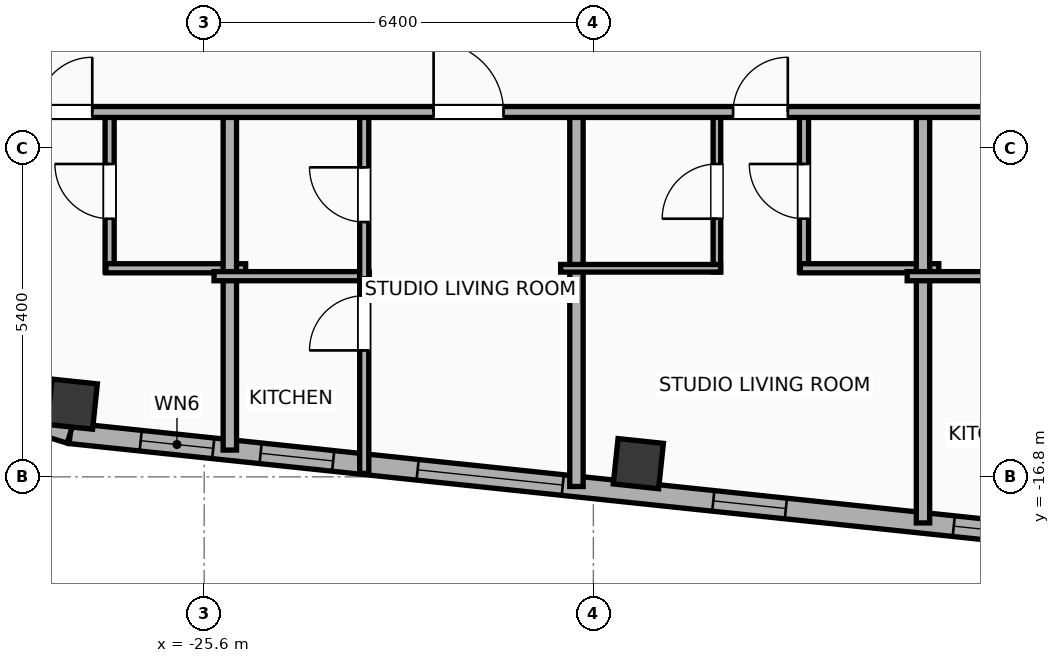
"""IFC4 building model, lengths in metres.
Left out: names, types, materials, properties, quantities, classifications, styles, units other than length and angle.
Written with IfcOpenShell. Run it as: python <this file> out.ifc"""

import sys

from ifc_helpers import new_model, si_unit, direction, frame, frame_2d, origin, origin_2d, place, context, subcontext, project, spatial, rectangle, hollow_rectangle, extrude, element, fill, save


model = new_model("IFC4")
c1 = context("Model", 3, precision=1e-05, world=origin(), true_north=direction((0.0, 1.0)))
c2 = subcontext(c1, "Body", "Model", "MODEL_VIEW")
j1 = project(units=[si_unit("LENGTHUNIT", "METRE"), si_unit("PLANEANGLEUNIT", "RADIAN")], contexts=[c1])
p1 = place(None, origin())
s1 = spatial("IfcSite", under=j1, at=p1, CompositionType="ELEMENT")
p2 = place(p1, origin())
s2 = spatial("IfcBuilding", under=s1, at=p2, CompositionType="ELEMENT")
p3 = place(p2, frame((0.0, 0.0, 279.5)))
s3 = spatial("IfcBuildingStorey", under=s2, at=p3, CompositionType="ELEMENT", Elevation=279.5)
for number, where, z_axis, x_axis in (
    (1, (-27.769, -15.604, 0.0), (0.0, 0.0, 1.0), (0.995, -0.105, 0.0)),
    (2, (-18.46, -16.583, 0.0), (0.0, 0.0, 1.0), (0.995, -0.105, 0.0)),
):
    element("IfcColumn", number, at=place(p3, frame(where, z_axis=z_axis, x_axis=x_axis)), inside=s3, PredefinedType="COLUMN", context=c2, shape_type="SweptSolid", body=[
        extrude(hollow_rectangle(XDim=0.75, YDim=0.75, WallThickness=0.025, at=origin_2d()), origin(), (0.0, 0.0, 1.0), 3.9),
    ])
p4 = place(p3, frame((18.708, -20.972, 0.0), z_axis=(0.0, 0.0, 1.0), x_axis=(-0.994521888554, 0.104528528102, 0.0)))
e3 = element("IfcWall", 3, at=p4, inside=s3, PredefinedType="ELEMENTEDWALL", context=c2, shape_type="SweptSolid", body=[
    extrude(rectangle(XDim=46.766, YDim=0.34, at=frame_2d((23.383, 0.0))), origin(), (0.0, 0.0, 1.0), 3.65),
])
p5 = place(p4, frame((23.833, 0.0, 0.75)))
e4 = element("IfcOpeningElement", 4, at=p5, cuts=e3, PredefinedType="OPENING", context=c2, shape_type="SweptSolid", body=[
    extrude(rectangle(XDim=2.4, YDim=2.1, at=frame_2d((1.2, 1.05))), frame((0.0, 0.18, 0.0), z_axis=(0.0, -1.0, 0.0), x_axis=(1.0, 0.0, 0.0)), (0.0, 0.0, 1.0), 0.36),
])
p6 = place(p4, frame((38.622, 0.0, 0.75)))
e5 = element("IfcOpeningElement", 5, at=p6, cuts=e3, PredefinedType="OPENING", context=c2, shape_type="SweptSolid", body=[
    extrude(rectangle(XDim=2.4, YDim=2.1, at=frame_2d((1.2, 1.05))), frame((0.0, 0.18, 0.0), z_axis=(0.0, -1.0, 0.0), x_axis=(1.0, 0.0, 0.0)), (0.0, 0.0, 1.0), 0.36),
])
p7 = place(p4, frame((44.402, 0.0, 0.75)))
e6 = element("IfcOpeningElement", 6, at=p7, cuts=e3, PredefinedType="OPENING", context=c2, shape_type="SweptSolid", body=[
    extrude(rectangle(XDim=1.2, YDim=2.05, at=frame_2d((0.6, 1.025))), frame((0.0, 0.18, 0.0), z_axis=(0.0, -1.0, 0.0), x_axis=(1.0, 0.0, 0.0)), (0.0, 0.0, 1.0), 0.36),
])
p8 = place(p4, frame((42.419, 0.0, 0.75)))
e7 = element("IfcOpeningElement", 7, at=p8, cuts=e3, PredefinedType="OPENING", context=c2, shape_type="SweptSolid", body=[
    extrude(rectangle(XDim=1.2, YDim=2.05, at=frame_2d((0.6, 1.025))), frame((0.0, 0.18, 0.0), z_axis=(0.0, -1.0, 0.0), x_axis=(1.0, 0.0, 0.0)), (0.0, 0.0, 1.0), 0.36),
])
p9 = place(p4, frame((34.933, 0.0, 0.75)))
e8 = element("IfcOpeningElement", 8, at=p9, cuts=e3, PredefinedType="OPENING", context=c2, shape_type="SweptSolid", body=[
    extrude(rectangle(XDim=1.2, YDim=2.05, at=frame_2d((0.6, 1.025))), frame((0.0, 0.18, 0.0), z_axis=(0.0, -1.0, 0.0), x_axis=(1.0, 0.0, 0.0)), (0.0, 0.0, 1.0), 0.36),
])
p10 = place(p4, frame((28.692, 0.0, 0.75)))
e9 = element("IfcOpeningElement", 9, at=p10, cuts=e3, PredefinedType="OPENING", context=c2, shape_type="SweptSolid", body=[
    extrude(rectangle(XDim=1.2, YDim=2.05, at=frame_2d((0.6, 1.025))), frame((0.0, 0.18, 0.0), z_axis=(0.0, -1.0, 0.0), x_axis=(1.0, 0.0, 0.0)), (0.0, 0.0, 1.0), 0.36),
])
p11 = place(p4, frame((30.957, 0.0, 0.75)))
e10 = element("IfcOpeningElement", 10, at=p11, cuts=e3, PredefinedType="OPENING", context=c2, shape_type="SweptSolid", body=[
    extrude(rectangle(XDim=1.2, YDim=2.05, at=frame_2d((0.6, 1.025))), frame((0.0, 0.18, 0.0), z_axis=(0.0, -1.0, 0.0), x_axis=(1.0, 0.0, 0.0)), (0.0, 0.0, 1.0), 0.36),
])
p12 = place(p4, frame((7.51, 0.0, 0.75)))
e11 = element("IfcOpeningElement", 11, at=p12, cuts=e3, PredefinedType="OPENING", context=c2, shape_type="SweptSolid", body=[
    extrude(rectangle(XDim=1.2, YDim=2.05, at=frame_2d((0.6, 1.025))), frame((0.0, 0.18, 0.0), z_axis=(0.0, -1.0, 0.0), x_axis=(1.0, 0.0, 0.0)), (0.0, 0.0, 1.0), 0.36),
])
p13 = place(p4, frame((4.177, 0.0, 0.75)))
e12 = element("IfcOpeningElement", 12, at=p13, cuts=e3, PredefinedType="OPENING", context=c2, shape_type="SweptSolid", body=[
    extrude(rectangle(XDim=1.2, YDim=2.05, at=frame_2d((0.6, 1.025))), frame((0.0, 0.18, 0.0), z_axis=(0.0, -1.0, 0.0), x_axis=(1.0, 0.0, 0.0)), (0.0, 0.0, 1.0), 0.36),
])
p14 = place(p4, frame((1.378, 0.0, 0.75)))
e13 = element("IfcOpeningElement", 13, at=p14, cuts=e3, PredefinedType="OPENING", context=c2, shape_type="SweptSolid", body=[
    extrude(rectangle(XDim=1.2, YDim=2.05, at=frame_2d((0.6, 1.025))), frame((0.0, 0.18, 0.0), z_axis=(0.0, -1.0, 0.0), x_axis=(1.0, 0.0, 0.0)), (0.0, 0.0, 1.0), 0.36),
])
p15 = place(p4, frame((20.254, 0.0, 0.75)))
e14 = element("IfcOpeningElement", 14, at=p15, cuts=e3, PredefinedType="OPENING", context=c2, shape_type="SweptSolid", body=[
    extrude(rectangle(XDim=1.2, YDim=2.05, at=frame_2d((0.6, 1.025))), frame((0.0, 0.18, 0.0), z_axis=(0.0, -1.0, 0.0), x_axis=(1.0, 0.0, 0.0)), (0.0, 0.0, 1.0), 0.36),
])
p16 = place(p4, frame((16.172, 0.0, 0.75)))
e15 = element("IfcOpeningElement", 15, at=p16, cuts=e3, PredefinedType="OPENING", context=c2, shape_type="SweptSolid", body=[
    extrude(rectangle(XDim=1.2, YDim=2.05, at=frame_2d((0.6, 1.025))), frame((0.0, 0.18, 0.0), z_axis=(0.0, -1.0, 0.0), x_axis=(1.0, 0.0, 0.0)), (0.0, 0.0, 1.0), 0.36),
])
p17 = place(p4, frame((12.11, 0.0, 0.75)))
e16 = element("IfcOpeningElement", 16, at=p17, cuts=e3, PredefinedType="OPENING", context=c2, shape_type="SweptSolid", body=[
    extrude(rectangle(XDim=1.2, YDim=2.05, at=frame_2d((0.6, 1.025))), frame((0.0, 0.18, 0.0), z_axis=(0.0, -1.0, 0.0), x_axis=(1.0, 0.0, 0.0)), (0.0, 0.0, 1.0), 0.36),
])
p18 = place(p3, frame((-27.802, -16.084, 0.0), z_axis=(0.0, 0.0, 1.0), x_axis=(-0.955007802701, 0.296580674994, 0.0)))
e17 = element("IfcWall", 17, at=p18, inside=s3, PredefinedType="ELEMENTEDWALL", context=c2, shape_type="SweptSolid", body=[
    extrude(rectangle(XDim=1.354, YDim=0.34, at=frame_2d((0.677, 0.0))), origin(), (0.0, 0.0, 1.0), 3.65),
])
p19 = place(p3, frame((-30.87, -12.296, 0.0), z_axis=(0.0, 0.0, 1.0), x_axis=(0.104533282919, 0.994521388791, 0.0)))
e18 = element("IfcWall", 18, at=p19, inside=s3, PredefinedType="ELEMENTEDWALL", context=c2, shape_type="SweptSolid", body=[
    extrude(rectangle(XDim=30.366, YDim=0.34, at=frame_2d((15.183, 0.0))), origin(), (0.0, 0.0, 1.0), 3.65),
])
p20 = place(p19, frame((5.842, 0.0, 0.75)))
e19 = element("IfcOpeningElement", 19, at=p20, cuts=e18, PredefinedType="OPENING", context=c2, shape_type="SweptSolid", body=[
    extrude(rectangle(XDim=1.8, YDim=2.1, at=frame_2d((0.9, 1.05))), frame((0.0, 0.18, 0.0), z_axis=(0.0, -1.0, 0.0), x_axis=(1.0, 0.0, 0.0)), (0.0, 0.0, 1.0), 0.36),
])
p21 = place(p19, frame((23.525, 0.0, 0.75)))
e20 = element("IfcOpeningElement", 20, at=p21, cuts=e18, PredefinedType="OPENING", context=c2, shape_type="SweptSolid", body=[
    extrude(rectangle(XDim=1.8, YDim=2.1, at=frame_2d((0.9, 1.05))), frame((0.0, 0.18, 0.0), z_axis=(0.0, -1.0, 0.0), x_axis=(1.0, 0.0, 0.0)), (0.0, 0.0, 1.0), 0.36),
])
p22 = place(p19, frame((27.368, 0.0, 0.75)))
e21 = element("IfcOpeningElement", 21, at=p22, cuts=e18, PredefinedType="OPENING", context=c2, shape_type="SweptSolid", body=[
    extrude(rectangle(XDim=1.2, YDim=2.05, at=frame_2d((0.6, 1.025))), frame((0.0, 0.18, 0.0), z_axis=(0.0, -1.0, 0.0), x_axis=(1.0, 0.0, 0.0)), (0.0, 0.0, 1.0), 0.36),
])
p23 = place(p19, frame((16.487, 0.0, 0.75)))
e22 = element("IfcOpeningElement", 22, at=p23, cuts=e18, PredefinedType="OPENING", context=c2, shape_type="SweptSolid", body=[
    extrude(rectangle(XDim=1.2, YDim=2.05, at=frame_2d((0.6, 1.025))), frame((0.0, 0.18, 0.0), z_axis=(0.0, -1.0, 0.0), x_axis=(1.0, 0.0, 0.0)), (0.0, 0.0, 1.0), 0.36),
])
p24 = place(p3, frame((-27.155, -13.43, 0.0), z_axis=(0.0, 0.0, 1.0), x_axis=(0.0, 1.0, 0.0)))
e23 = element("IfcWall", 23, at=p24, inside=s3, PredefinedType="PLUMBINGWALL", context=c2, shape_type="SweptSolid", body=[
    extrude(rectangle(XDim=2.65, YDim=0.15, at=frame_2d((1.325, 0.0))), origin(), (0.0, 0.0, 1.0), 3.65),
])
p25 = place(p24, frame((0.875, 0.0, 0.0)))
e24 = element("IfcOpeningElement", 24, at=p25, cuts=e23, PredefinedType="OPENING", context=c2, shape_type="SweptSolid", body=[
    extrude(rectangle(XDim=0.9, YDim=2.05, at=frame_2d((0.45, 1.025))), frame((0.0, 0.085, 0.0), z_axis=(0.0, -1.0, 0.0), x_axis=(1.0, 0.0, 0.0)), (0.0, 0.0, 1.0), 0.17),
])
p26 = place(p3, frame((-27.215, -13.37, 0.0), z_axis=(0.0, 0.0, 1.0), x_axis=(1.0, 0.0, 0.0)))
e25 = element("IfcWall", 25, at=p26, inside=s3, PredefinedType="PLUMBINGWALL", context=c2, shape_type="SweptSolid", body=[
    extrude(rectangle(XDim=2.297, YDim=0.15, at=frame_2d((1.148, 0.0))), origin(), (0.0, 0.0, 1.0), 3.65),
])
p27 = place(p3, frame((-25.178, -16.36, 0.0), z_axis=(0.0, 0.0, 1.0), x_axis=(0.0, 1.0, 0.0)))
e26 = element("IfcWall", 26, at=p27, inside=s3, PredefinedType="PARTITIONING", context=c2, shape_type="SweptSolid", body=[
    extrude(rectangle(XDim=5.64, YDim=0.22, at=frame_2d((2.82, 0.0))), origin(), (0.0, 0.0, 1.0), 3.65),
])
p28 = place(p3, frame((-25.438, -13.5, 0.0), z_axis=(0.0, 0.0, 1.0), x_axis=(1.0, 0.0, 0.0)))
e27 = element("IfcWall", 27, at=p28, inside=s3, PredefinedType="PLUMBINGWALL", context=c2, shape_type="SweptSolid", body=[
    extrude(rectangle(XDim=2.55, YDim=0.15, at=frame_2d((1.275, 0.0))), origin(), (0.0, 0.0, 1.0), 3.65),
])
p29 = place(p3, frame((-22.968, -16.743, 0.0), z_axis=(0.0, 0.0, 1.0), x_axis=(0.0, 1.0, 0.0)))
e28 = element("IfcWall", 28, at=p29, inside=s3, PredefinedType="PLUMBINGWALL", context=c2, shape_type="SweptSolid", body=[
    extrude(rectangle(XDim=3.283, YDim=0.15, at=frame_2d((1.641, 0.0))), origin(), (0.0, 0.0, 1.0), 3.65),
])
p30 = place(p29, frame((2.022, 0.0, 0.0)))
e29 = element("IfcOpeningElement", 29, at=p30, cuts=e28, PredefinedType="OPENING", context=c2, shape_type="SweptSolid", body=[
    extrude(rectangle(XDim=0.9, YDim=2.05, at=frame_2d((0.45, 1.025))), frame((0.0, 0.085, 0.0), z_axis=(0.0, -1.0, 0.0), x_axis=(1.0, 0.0, 0.0)), (0.0, 0.0, 1.0), 0.17),
])
p31 = place(p3, frame((-22.968, -13.54, 0.0), z_axis=(0.0, 0.0, 1.0), x_axis=(0.0, 1.0, 0.0)))
e30 = element("IfcWall", 30, at=p31, inside=s3, PredefinedType="PLUMBINGWALL", context=c2, shape_type="SweptSolid", body=[
    extrude(rectangle(XDim=2.76, YDim=0.15, at=frame_2d((1.38, 0.0))), origin(), (0.0, 0.0, 1.0), 3.65),
])
p32 = place(p31, frame((0.93, 0.0, 0.0)))
e31 = element("IfcOpeningElement", 31, at=p32, cuts=e30, PredefinedType="OPENING", context=c2, shape_type="SweptSolid", body=[
    extrude(rectangle(XDim=0.9, YDim=2.05, at=frame_2d((0.45, 1.025))), frame((0.0, 0.085, 0.0), z_axis=(0.0, -1.0, 0.0), x_axis=(1.0, 0.0, 0.0)), (0.0, 0.0, 1.0), 0.17),
])
p33 = place(p3, frame((-19.478, -16.959, 0.0), z_axis=(0.0, 0.0, 1.0), x_axis=(0.0, 1.0, 0.0)))
e32 = element("IfcWall", 32, at=p33, inside=s3, PredefinedType="PARTITIONING", context=c2, shape_type="SweptSolid", body=[
    extrude(rectangle(XDim=6.239, YDim=0.22, at=frame_2d((3.119, 0.0))), origin(), (0.0, 0.0, 1.0), 3.65),
])
p34 = place(p3, frame((-17.168, -13.43, 0.0), z_axis=(0.0, 0.0, 1.0), x_axis=(0.0, 1.0, 0.0)))
e33 = element("IfcWall", 33, at=p34, inside=s3, PredefinedType="PARTITIONING", context=c2, shape_type="SweptSolid", body=[
    extrude(rectangle(XDim=2.65, YDim=0.125, at=frame_2d((1.325, 0.0))), origin(), (0.0, 0.0, 1.0), 3.65),
])
p35 = place(p34, frame((0.875, 0.0, 0.0)))
e34 = element("IfcOpeningElement", 34, at=p35, cuts=e33, PredefinedType="OPENING", context=c2, shape_type="SweptSolid", body=[
    extrude(rectangle(XDim=0.9, YDim=2.05, at=frame_2d((0.45, 1.025))), frame((0.0, 0.073, 0.0), z_axis=(0.0, -1.0, 0.0), x_axis=(1.0, 0.0, 0.0)), (0.0, 0.0, 1.0), 0.145),
])
p36 = place(p3, frame((-15.736, -13.43, 0.0), z_axis=(0.0, 0.0, 1.0), x_axis=(0.0, 1.0, 0.0)))
e35 = element("IfcWall", 35, at=p36, inside=s3, PredefinedType="PLUMBINGWALL", context=c2, shape_type="SweptSolid", body=[
    extrude(rectangle(XDim=2.65, YDim=0.15, at=frame_2d((1.325, 0.0))), origin(), (0.0, 0.0, 1.0), 3.65),
])
p37 = place(p36, frame((0.875, 0.0, 0.0)))
e36 = element("IfcOpeningElement", 36, at=p37, cuts=e35, PredefinedType="OPENING", context=c2, shape_type="SweptSolid", body=[
    extrude(rectangle(XDim=0.9, YDim=2.05, at=frame_2d((0.45, 1.025))), frame((0.0, 0.085, 0.0), z_axis=(0.0, -1.0, 0.0), x_axis=(1.0, 0.0, 0.0)), (0.0, 0.0, 1.0), 0.17),
])
p38 = place(p3, frame((-19.738, -13.37, 0.0), z_axis=(0.0, 0.0, 1.0), x_axis=(1.0, 0.0, 0.0)))
e37 = element("IfcWall", 37, at=p38, inside=s3, PredefinedType="PARTITIONING", context=c2, shape_type="SweptSolid", body=[
    extrude(rectangle(XDim=2.63, YDim=0.125, at=frame_2d((1.315, 0.0))), origin(), (0.0, 0.0, 1.0), 3.65),
])
p39 = place(p3, frame((-15.796, -13.37, 0.0), z_axis=(0.0, 0.0, 1.0), x_axis=(1.0, 0.0, 0.0)))
e38 = element("IfcWall", 38, at=p39, inside=s3, PredefinedType="PLUMBINGWALL", context=c2, shape_type="SweptSolid", body=[
    extrude(rectangle(XDim=2.277, YDim=0.15, at=frame_2d((1.138, 0.0))), origin(), (0.0, 0.0, 1.0), 3.65),
])
p40 = place(p3, frame((-13.779, -17.558, 0.0), z_axis=(0.0, 0.0, 1.0), x_axis=(0.0, 1.0, 0.0)))
e39 = element("IfcWall", 39, at=p40, inside=s3, PredefinedType="PARTITIONING", context=c2, shape_type="SweptSolid", body=[
    extrude(rectangle(XDim=6.838, YDim=0.22, at=frame_2d((3.419, 0.0))), origin(), (0.0, 0.0, 1.0), 3.65),
])
p41 = place(p3, frame((-14.039, -13.5, 0.0), z_axis=(0.0, 0.0, 1.0), x_axis=(1.0, 0.0, 0.0)))
e40 = element("IfcWall", 40, at=p41, inside=s3, PredefinedType="PLUMBINGWALL", context=c2, shape_type="SweptSolid", body=[
    extrude(rectangle(XDim=2.55, YDim=0.15, at=frame_2d((1.275, 0.0))), origin(), (0.0, 0.0, 1.0), 3.65),
])
p42 = place(p3, frame((-30.713, -10.8, 0.0), z_axis=(0.0, 0.0, 1.0), x_axis=(1.0, 0.0, 0.0)))
e41 = element("IfcWall", 41, at=p42, inside=s3, PredefinedType="PARTITIONING", context=c2, shape_type="SweptSolid", body=[
    extrude(rectangle(XDim=22.633, YDim=0.18, at=frame_2d((11.316, 0.0))), origin(), (0.0, 0.0, 1.0), 3.65),
])
p43 = place(p42, frame((2.372, 0.0, 0.0)))
e42 = element("IfcOpeningElement", 42, at=p43, cuts=e41, PredefinedType="OPENING", context=c2, shape_type="SweptSolid", body=[
    extrude(rectangle(XDim=0.9, YDim=2.05, at=frame_2d((0.45, 1.025))), frame((0.0, 0.1, 0.0), z_axis=(0.0, -1.0, 0.0), x_axis=(1.0, 0.0, 0.0)), (0.0, 0.0, 1.0), 0.2),
])
p44 = place(p42, frame((8.885, 0.0, 0.0)))
e43 = element("IfcOpeningElement", 43, at=p44, cuts=e41, PredefinedType="OPENING", context=c2, shape_type="SweptSolid", body=[
    extrude(rectangle(XDim=1.15, YDim=2.05, at=frame_2d((0.575, 1.025))), frame((0.0, 0.1, 0.0), z_axis=(0.0, -1.0, 0.0), x_axis=(1.0, 0.0, 0.0)), (0.0, 0.0, 1.0), 0.2),
])
p45 = place(p42, frame((13.811, 0.0, 0.0)))
e44 = element("IfcOpeningElement", 44, at=p45, cuts=e41, PredefinedType="OPENING", context=c2, shape_type="SweptSolid", body=[
    extrude(rectangle(XDim=0.9, YDim=2.05, at=frame_2d((0.45, 1.025))), frame((0.0, 0.1, 0.0), z_axis=(0.0, -1.0, 0.0), x_axis=(1.0, 0.0, 0.0)), (0.0, 0.0, 1.0), 0.2),
])
p46 = place(p42, frame((20.283, 0.0, 0.0)))
e45 = element("IfcOpeningElement", 45, at=p46, cuts=e41, PredefinedType="OPENING", context=c2, shape_type="SweptSolid", body=[
    extrude(rectangle(XDim=1.15, YDim=2.05, at=frame_2d((0.575, 1.025))), frame((0.0, 0.1, 0.0), z_axis=(0.0, -1.0, 0.0), x_axis=(1.0, 0.0, 0.0)), (0.0, 0.0, 1.0), 0.2),
])
p47 = place(p6, origin())
e46 = element("IfcWindow", 46, at=p47, inside=s3, PartitioningType="SINGLE_PANEL", PredefinedType="WINDOW", context=c2, shape_type="SweptSolid", body=[
    extrude(rectangle(XDim=2.4, YDim=2.1, at=frame_2d((1.2, 1.05))), frame((0.0, 0.03, 0.0), z_axis=(0.0, -1.0, 0.0), x_axis=(1.0, 0.0, 0.0)), (0.0, 0.0, 1.0), 0.06),
])
fill(e5, e46)
p48 = place(p7, origin())
e47 = element("IfcWindow", 47, at=p48, inside=s3, PartitioningType="SINGLE_PANEL", PredefinedType="WINDOW", context=c2, shape_type="SweptSolid", body=[
    extrude(rectangle(XDim=1.2, YDim=2.05, at=frame_2d((0.6, 1.025))), frame((0.0, 0.03, 0.0), z_axis=(0.0, -1.0, 0.0), x_axis=(1.0, 0.0, 0.0)), (0.0, 0.0, 1.0), 0.06),
])
fill(e6, e47)
p49 = place(p8, origin())
e48 = element("IfcWindow", 48, at=p49, inside=s3, PartitioningType="SINGLE_PANEL", PredefinedType="WINDOW", context=c2, shape_type="SweptSolid", body=[
    extrude(rectangle(XDim=1.2, YDim=2.05, at=frame_2d((0.6, 1.025))), frame((0.0, 0.03, 0.0), z_axis=(0.0, -1.0, 0.0), x_axis=(1.0, 0.0, 0.0)), (0.0, 0.0, 1.0), 0.06),
])
fill(e7, e48)
p50 = place(p9, origin())
e49 = element("IfcWindow", 49, at=p50, inside=s3, PartitioningType="SINGLE_PANEL", PredefinedType="WINDOW", context=c2, shape_type="SweptSolid", body=[
    extrude(rectangle(XDim=1.2, YDim=2.05, at=frame_2d((0.6, 1.025))), frame((0.0, 0.03, 0.0), z_axis=(0.0, -1.0, 0.0), x_axis=(1.0, 0.0, 0.0)), (0.0, 0.0, 1.0), 0.06),
])
fill(e8, e49)
p51 = place(p11, origin())
e50 = element("IfcWindow", 50, at=p51, inside=s3, PartitioningType="SINGLE_PANEL", PredefinedType="WINDOW", context=c2, shape_type="SweptSolid", body=[
    extrude(rectangle(XDim=1.2, YDim=2.05, at=frame_2d((0.6, 1.025))), frame((0.0, 0.03, 0.0), z_axis=(0.0, -1.0, 0.0), x_axis=(1.0, 0.0, 0.0)), (0.0, 0.0, 1.0), 0.06),
])
fill(e10, e50)
p52 = place(p25, origin())
e51 = element("IfcDoor", 51, at=p52, inside=s3, OperationType="SINGLE_SWING_RIGHT", PredefinedType="DOOR", context=c2, shape_type="SweptSolid", body=[
    extrude(rectangle(XDim=0.9, YDim=2.05, at=frame_2d((0.45, 1.025))), frame((0.0, 0.025, 0.0), z_axis=(0.0, -1.0, 0.0), x_axis=(1.0, 0.0, 0.0)), (0.0, 0.0, 1.0), 0.05),
])
fill(e24, e51)
p53 = place(p30, origin())
e52 = element("IfcDoor", 52, at=p53, inside=s3, OperationType="SINGLE_SWING_LEFT", PredefinedType="DOOR", context=c2, shape_type="SweptSolid", body=[
    extrude(rectangle(XDim=0.9, YDim=2.05, at=frame_2d((0.45, 1.025))), frame((0.0, 0.025, 0.0), z_axis=(0.0, -1.0, 0.0), x_axis=(1.0, 0.0, 0.0)), (0.0, 0.0, 1.0), 0.05),
])
fill(e29, e52)
p54 = place(p32, origin())
e53 = element("IfcDoor", 53, at=p54, inside=s3, OperationType="SINGLE_SWING_RIGHT", PredefinedType="DOOR", context=c2, shape_type="SweptSolid", body=[
    extrude(rectangle(XDim=0.9, YDim=2.05, at=frame_2d((0.45, 1.025))), frame((0.0, 0.025, 0.0), z_axis=(0.0, -1.0, 0.0), x_axis=(1.0, 0.0, 0.0)), (0.0, 0.0, 1.0), 0.05),
])
fill(e31, e53)
p55 = place(p35, origin())
e54 = element("IfcDoor", 54, at=p55, inside=s3, OperationType="SINGLE_SWING_LEFT", PredefinedType="DOOR", context=c2, shape_type="SweptSolid", body=[
    extrude(rectangle(XDim=0.9, YDim=2.05, at=frame_2d((0.45, 1.025))), frame((0.0, 0.025, 0.0), z_axis=(0.0, -1.0, 0.0), x_axis=(1.0, 0.0, 0.0)), (0.0, 0.0, 1.0), 0.05),
])
fill(e34, e54)
p56 = place(p37, origin())
e55 = element("IfcDoor", 55, at=p56, inside=s3, OperationType="SINGLE_SWING_RIGHT", PredefinedType="DOOR", context=c2, shape_type="SweptSolid", body=[
    extrude(rectangle(XDim=0.9, YDim=2.05, at=frame_2d((0.45, 1.025))), frame((0.0, 0.025, 0.0), z_axis=(0.0, -1.0, 0.0), x_axis=(1.0, 0.0, 0.0)), (0.0, 0.0, 1.0), 0.05),
])
fill(e36, e55)
p57 = place(p43, origin())
e56 = element("IfcDoor", 56, at=p57, inside=s3, OperationType="SINGLE_SWING_RIGHT", PredefinedType="DOOR", context=c2, shape_type="SweptSolid", body=[
    extrude(rectangle(XDim=0.9, YDim=2.05, at=frame_2d((0.45, 1.025))), frame((0.0, 0.025, 0.0), z_axis=(0.0, -1.0, 0.0), x_axis=(1.0, 0.0, 0.0)), (0.0, 0.0, 1.0), 0.05),
])
fill(e42, e56)
p58 = place(p44, origin())
e57 = element("IfcDoor", 57, at=p58, inside=s3, OperationType="SINGLE_SWING_LEFT", PredefinedType="DOOR", context=c2, shape_type="SweptSolid", body=[
    extrude(rectangle(XDim=1.15, YDim=2.05, at=frame_2d((0.575, 1.025))), frame((0.0, 0.025, 0.0), z_axis=(0.0, -1.0, 0.0), x_axis=(1.0, 0.0, 0.0)), (0.0, 0.0, 1.0), 0.05),
])
fill(e43, e57)
p59 = place(p45, origin())
e58 = element("IfcDoor", 58, at=p59, inside=s3, OperationType="SINGLE_SWING_RIGHT", PredefinedType="DOOR", context=c2, shape_type="SweptSolid", body=[
    extrude(rectangle(XDim=0.9, YDim=2.05, at=frame_2d((0.45, 1.025))), frame((0.0, 0.025, 0.0), z_axis=(0.0, -1.0, 0.0), x_axis=(1.0, 0.0, 0.0)), (0.0, 0.0, 1.0), 0.05),
])
fill(e44, e58)
save(model, sys.argv[1])
